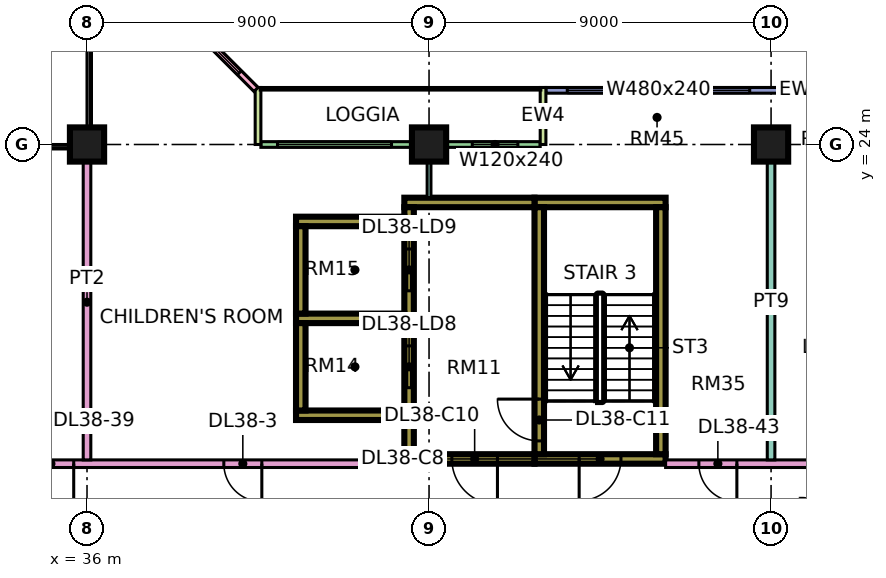
"""IFC4 building model, lengths in metres.
Left out: names, types, materials, properties, quantities, classifications, styles, units other than length and angle.
Written with IfcOpenShell. Run it as: python <this file> out.ifc"""

import sys

from ifc_helpers import new_model, si_unit, direction, frame, frame_2d, origin, origin_2d, place, context, subcontext, project, spatial, rectangle, extrude, element, fill, save


model = new_model("IFC4")
c1 = context("Model", 3, precision=1e-05, world=origin(), true_north=direction((0.0, 1.0)))
c2 = subcontext(c1, "Body", "Model", "MODEL_VIEW")
j1 = project(units=[si_unit("LENGTHUNIT", "METRE"), si_unit("PLANEANGLEUNIT", "RADIAN")], contexts=[c1])
p1 = place(None, origin())
s1 = spatial("IfcSite", under=j1, at=p1, CompositionType="ELEMENT")
p2 = place(p1, origin())
s2 = spatial("IfcBuilding", under=s1, at=p2, CompositionType="ELEMENT")
p3 = place(p2, frame((0.0, 0.0, 168.65)))
s3 = spatial("IfcBuildingStorey", under=s2, at=p3, CompositionType="ELEMENT", Elevation=168.65)
for number, where, z_axis, x_axis in (
    (1, (36.0, 24.0, 0.0), (0.0, 0.0, 1.0), (1.0, 0.0, 0.0)),
    (2, (45.0, 24.0, 0.0), (0.0, 0.0, 1.0), (1.0, 0.0, 0.0)),
    (3, (54.0, 24.0, 0.0), (0.0, 0.0, 1.0), (1.0, 0.0, 0.0)),
):
    element("IfcColumn", number, at=place(p3, frame(where, z_axis=z_axis, x_axis=x_axis)), inside=s3, PredefinedType="COLUMN", context=c2, shape_type="SweptSolid", body=[
        extrude(rectangle(XDim=0.9, YDim=0.9, at=origin_2d()), origin(), (0.0, 0.0, 1.0), 3.75),
    ])
p4 = place(p3, frame((47.775, 15.725, 0.0), z_axis=(0.0, 0.0, 1.0), x_axis=(1.0, 0.0, 0.0)))
e4 = element("IfcWall", 4, at=p4, inside=s3, PredefinedType="SHEAR", context=c2, shape_type="SweptSolid", body=[
    extrude(rectangle(XDim=3.45, YDim=0.25, at=frame_2d((1.725, 0.0))), origin(), (0.0, 0.0, 1.0), 3.75),
])
p5 = place(p4, frame((1.175, 0.0, 0.0)))
e5 = element("IfcOpeningElement", 5, at=p5, cuts=e4, PredefinedType="OPENING", context=c2, shape_type="SweptSolid", body=[
    extrude(rectangle(XDim=1.1, YDim=2.2, at=frame_2d((0.55, 1.1))), frame((0.0, 0.135, 0.0), z_axis=(0.0, -1.0, 0.0), x_axis=(1.0, 0.0, 0.0)), (0.0, 0.0, 1.0), 0.27),
])
p6 = place(p3, frame((47.775, 22.475, 0.0), z_axis=(0.0, 0.0, 1.0), x_axis=(1.0, 0.0, 0.0)))
e6 = element("IfcWall", 6, at=p6, inside=s3, PredefinedType="SHEAR", context=c2, shape_type="SweptSolid", body=[
    extrude(rectangle(XDim=3.45, YDim=0.25, at=frame_2d((1.725, 0.0))), origin(), (0.0, 0.0, 1.0), 3.75),
])
p7 = place(p3, frame((47.9, 15.85, 0.0), z_axis=(0.0, 0.0, 1.0), x_axis=(0.0, 1.0, 0.0)))
e7 = element("IfcWall", 7, at=p7, inside=s3, PredefinedType="SHEAR", context=c2, shape_type="SweptSolid", body=[
    extrude(rectangle(XDim=6.5, YDim=0.25, at=frame_2d((3.25, 0.0))), origin(), (0.0, 0.0, 1.0), 3.75),
])
p8 = place(p7, frame((0.35, 0.0, 0.0)))
e8 = element("IfcOpeningElement", 8, at=p8, cuts=e7, PredefinedType="OPENING", context=c2, shape_type="SweptSolid", body=[
    extrude(rectangle(XDim=1.1, YDim=2.2, at=frame_2d((0.55, 1.1))), frame((0.0, 0.135, 0.0), z_axis=(0.0, -1.0, 0.0), x_axis=(1.0, 0.0, 0.0)), (0.0, 0.0, 1.0), 0.27),
])
p9 = place(p3, frame((51.1, 15.85, 0.0), z_axis=(0.0, 0.0, 1.0), x_axis=(0.0, 1.0, 0.0)))
e9 = element("IfcWall", 9, at=p9, inside=s3, PredefinedType="SHEAR", context=c2, shape_type="SweptSolid", body=[
    extrude(rectangle(XDim=6.5, YDim=0.25, at=frame_2d((3.25, 0.0))), origin(), (0.0, 0.0, 1.0), 3.75),
])
p10 = place(p3, frame((44.35, 15.725, 0.0), z_axis=(0.0, 0.0, 1.0), x_axis=(1.0, 0.0, 0.0)))
e10 = element("IfcWall", 10, at=p10, inside=s3, PredefinedType="SHEAR", context=c2, shape_type="SweptSolid", body=[
    extrude(rectangle(XDim=3.425, YDim=0.25, at=frame_2d((1.712, 0.0))), origin(), (0.0, 0.0, 1.0), 3.75),
])
p11 = place(p10, frame((1.25, 0.0, 0.0)))
e11 = element("IfcOpeningElement", 11, at=p11, cuts=e10, PredefinedType="OPENING", context=c2, shape_type="SweptSolid", body=[
    extrude(rectangle(XDim=1.2, YDim=2.2, at=frame_2d((0.6, 1.1))), frame((0.0, 0.135, 0.0), z_axis=(0.0, -1.0, 0.0), x_axis=(1.0, 0.0, 0.0)), (0.0, 0.0, 1.0), 0.27),
])
p12 = place(p3, frame((44.35, 22.475, 0.0), z_axis=(0.0, 0.0, 1.0), x_axis=(1.0, 0.0, 0.0)))
e12 = element("IfcWall", 12, at=p12, inside=s3, PredefinedType="SHEAR", context=c2, shape_type="SweptSolid", body=[
    extrude(rectangle(XDim=3.425, YDim=0.25, at=frame_2d((1.712, 0.0))), origin(), (0.0, 0.0, 1.0), 3.75),
])
p13 = place(p3, frame((44.475, 15.85, 0.0), z_axis=(0.0, 0.0, 1.0), x_axis=(0.0, 1.0, 0.0)))
e13 = element("IfcWall", 13, at=p13, inside=s3, PredefinedType="SHEAR", context=c2, shape_type="SweptSolid", body=[
    extrude(rectangle(XDim=6.5, YDim=0.25, at=frame_2d((3.25, 0.0))), origin(), (0.0, 0.0, 1.0), 3.75),
])
p14 = place(p13, frame((1.75, 0.0, 0.0)))
e14 = element("IfcOpeningElement", 14, at=p14, cuts=e13, PredefinedType="OPENING", context=c2, shape_type="SweptSolid", body=[
    extrude(rectangle(XDim=1.1, YDim=2.2, at=frame_2d((0.55, 1.1))), frame((0.0, 0.135, 0.0), z_axis=(0.0, -1.0, 0.0), x_axis=(1.0, 0.0, 0.0)), (0.0, 0.0, 1.0), 0.27),
])
p15 = place(p13, frame((4.3, 0.0, 0.0)))
e15 = element("IfcOpeningElement", 15, at=p15, cuts=e13, PredefinedType="OPENING", context=c2, shape_type="SweptSolid", body=[
    extrude(rectangle(XDim=1.1, YDim=2.2, at=frame_2d((0.55, 1.1))), frame((0.0, 0.135, 0.0), z_axis=(0.0, -1.0, 0.0), x_axis=(1.0, 0.0, 0.0)), (0.0, 0.0, 1.0), 0.27),
])
for number, where, z_axis, x_axis in (
    (16, (41.5, 16.875, 0.0), (0.0, 0.0, 1.0), (1.0, 0.0, 0.0)),
    (17, (41.5, 19.425, 0.0), (0.0, 0.0, 1.0), (1.0, 0.0, 0.0)),
    (18, (41.5, 21.975, 0.0), (0.0, 0.0, 1.0), (1.0, 0.0, 0.0)),
):
    element("IfcWall", number, at=place(p3, frame(where, z_axis=z_axis, x_axis=x_axis)), inside=s3, PredefinedType="SHEAR", context=c2, shape_type="SweptSolid", body=[
        extrude(rectangle(XDim=2.85, YDim=0.25, at=frame_2d((1.425, 0.0))), origin(), (0.0, 0.0, 1.0), 3.75),
    ])
for number, where, z_axis, x_axis in (
    (19, (41.625, 17.0, 0.0), (0.0, 0.0, 1.0), (0.0, 1.0, 0.0)),
    (20, (41.625, 19.55, 0.0), (0.0, 0.0, 1.0), (0.0, 1.0, 0.0)),
):
    element("IfcWall", number, at=place(p3, frame(where, z_axis=z_axis, x_axis=x_axis)), inside=s3, PredefinedType="SHEAR", context=c2, shape_type="SweptSolid", body=[
        extrude(rectangle(XDim=2.3, YDim=0.25, at=frame_2d((1.15, 0.0))), origin(), (0.0, 0.0, 1.0), 3.75),
    ])
p16 = place(p3, frame((61.5, 25.425, 0.0), z_axis=(0.0, 0.0, 1.0), x_axis=(-1.0, 0.0, 0.0)))
e21 = element("IfcWall", 21, at=p16, inside=s3, PredefinedType="SOLIDWALL", context=c2, shape_type="SweptSolid", body=[
    extrude(rectangle(XDim=13.425, YDim=0.15, at=frame_2d((6.712, 0.0))), origin(), (0.0, 0.0, 1.0), 3.35),
])
p17 = place(p16, frame((0.3, 0.0, 0.45)))
e22 = element("IfcOpeningElement", 22, at=p17, cuts=e21, PredefinedType="OPENING", context=c2, shape_type="SweptSolid", body=[
    extrude(rectangle(XDim=0.9, YDim=2.4, at=frame_2d((0.45, 1.2))), frame((0.0, 0.085, 0.0), z_axis=(0.0, -1.0, 0.0), x_axis=(1.0, 0.0, 0.0)), (0.0, 0.0, 1.0), 0.17),
])
p18 = place(p16, frame((2.1, 0.0, 0.45)))
e23 = element("IfcOpeningElement", 23, at=p18, cuts=e21, PredefinedType="OPENING", context=c2, shape_type="SweptSolid", body=[
    extrude(rectangle(XDim=1.8, YDim=2.4, at=frame_2d((0.9, 1.2))), frame((0.0, 0.085, 0.0), z_axis=(0.0, -1.0, 0.0), x_axis=(1.0, 0.0, 0.0)), (0.0, 0.0, 1.0), 0.17),
])
p19 = place(p16, frame((5.1, 0.0, 0.45)))
e24 = element("IfcOpeningElement", 24, at=p19, cuts=e21, PredefinedType="OPENING", context=c2, shape_type="SweptSolid", body=[
    extrude(rectangle(XDim=1.8, YDim=2.4, at=frame_2d((0.9, 1.2))), frame((0.0, 0.085, 0.0), z_axis=(0.0, -1.0, 0.0), x_axis=(1.0, 0.0, 0.0)), (0.0, 0.0, 1.0), 0.17),
])
p20 = place(p16, frame((8.062, 0.0, 0.45)))
e25 = element("IfcOpeningElement", 25, at=p20, cuts=e21, PredefinedType="OPENING", context=c2, shape_type="SweptSolid", body=[
    extrude(rectangle(XDim=4.8, YDim=2.4, at=frame_2d((2.4, 1.2))), frame((0.0, 0.085, 0.0), z_axis=(0.0, -1.0, 0.0), x_axis=(1.0, 0.0, 0.0)), (0.0, 0.0, 1.0), 0.17),
])
p21 = place(p3, frame((47.925, 24.0, 0.0), z_axis=(0.0, 0.0, 1.0), x_axis=(-1.0, 0.0, 0.0)))
e26 = element("IfcWall", 26, at=p21, inside=s3, PredefinedType="SOLIDWALL", context=c2, shape_type="SweptSolid", body=[
    extrude(rectangle(XDim=7.35, YDim=0.15, at=frame_2d((3.675, 0.0))), origin(), (0.0, 0.0, 1.0), 3.35),
])
p22 = place(p21, frame((0.587, 0.0, 0.45)))
e27 = element("IfcOpeningElement", 27, at=p22, cuts=e26, PredefinedType="OPENING", context=c2, shape_type="SweptSolid", body=[
    extrude(rectangle(XDim=1.2, YDim=2.4, at=frame_2d((0.6, 1.2))), frame((0.0, 0.085, 0.0), z_axis=(0.0, -1.0, 0.0), x_axis=(1.0, 0.0, 0.0)), (0.0, 0.0, 1.0), 0.17),
])
p23 = place(p21, frame((3.913, 0.0, 0.45)))
e28 = element("IfcOpeningElement", 28, at=p23, cuts=e26, PredefinedType="OPENING", context=c2, shape_type="SweptSolid", body=[
    extrude(rectangle(XDim=3.0, YDim=2.4, at=frame_2d((1.5, 1.2))), frame((0.0, 0.085, 0.0), z_axis=(0.0, -1.0, 0.0), x_axis=(1.0, 0.0, 0.0)), (0.0, 0.0, 1.0), 0.17),
])
for number, where, z_axis, x_axis in (
    (29, (48.0, 25.5, 0.0), (0.0, 0.0, 1.0), (0.0, -1.0, 0.0)),
    (30, (40.5, 25.5, 0.0), (0.0, 0.0, 1.0), (0.0, -1.0, 0.0)),
):
    element("IfcWall", number, at=place(p3, frame(where, z_axis=z_axis, x_axis=x_axis)), inside=s3, PredefinedType="SOLIDWALL", context=c2, shape_type="SweptSolid", body=[
        extrude(rectangle(XDim=1.5, YDim=0.15, at=frame_2d((0.75, 0.0))), origin(), (0.0, 0.0, 1.0), 3.35),
    ])
p24 = place(p3, frame((40.447, 25.447, 0.0), z_axis=(0.0, 0.0, 1.0), x_axis=(-0.707106781187, 0.707106781187, 0.0)))
e31 = element("IfcWall", 31, at=p24, inside=s3, PredefinedType="SOLIDWALL", context=c2, shape_type="SweptSolid", body=[
    extrude(rectangle(XDim=4.243, YDim=0.15, at=frame_2d((2.121, 0.0))), origin(), (0.0, 0.0, 1.0), 3.35),
])
p25 = place(p24, frame((0.621, 0.0, 0.45)))
e32 = element("IfcOpeningElement", 32, at=p25, cuts=e31, PredefinedType="OPENING", context=c2, shape_type="SweptSolid", body=[
    extrude(rectangle(XDim=3.0, YDim=2.4, at=frame_2d((1.5, 1.2))), frame((0.0, 0.085, 0.0), z_axis=(0.0, -1.0, 0.0), x_axis=(1.0, 0.0, 0.0)), (0.0, 0.0, 1.0), 0.17),
])
p26 = place(p3, frame((34.0, 15.6, 0.0), z_axis=(0.0, 0.0, 1.0), x_axis=(1.0, 0.0, 0.0)))
e33 = element("IfcWall", 33, at=p26, inside=s3, PredefinedType="PARTITIONING", context=c2, shape_type="SweptSolid", body=[
    extrude(rectangle(XDim=10.35, YDim=0.2, at=frame_2d((5.175, 0.0))), origin(), (0.0, 0.0, 1.0), 3.35),
])
p27 = place(p26, frame((5.6, 0.0, 0.0)))
e34 = element("IfcOpeningElement", 34, at=p27, cuts=e33, PredefinedType="OPENING", context=c2, shape_type="SweptSolid", body=[
    extrude(rectangle(XDim=1.0, YDim=2.1, at=frame_2d((0.5, 1.05))), frame((0.0, 0.11, 0.0), z_axis=(0.0, -1.0, 0.0), x_axis=(1.0, 0.0, 0.0)), (0.0, 0.0, 1.0), 0.22),
])
p28 = place(p26, frame((0.45, 0.0, 0.0)))
e35 = element("IfcOpeningElement", 35, at=p28, cuts=e33, PredefinedType="OPENING", context=c2, shape_type="SweptSolid", body=[
    extrude(rectangle(XDim=1.2, YDim=2.1, at=frame_2d((0.6, 1.05))), frame((0.0, 0.11, 0.0), z_axis=(0.0, -1.0, 0.0), x_axis=(1.0, 0.0, 0.0)), (0.0, 0.0, 1.0), 0.22),
])
p29 = place(p3, frame((36.0, 15.7, 0.0), z_axis=(0.0, 0.0, 1.0), x_axis=(0.0, 1.0, 0.0)))
e36 = element("IfcWall", 36, at=p29, inside=s3, PredefinedType="PARTITIONING", context=c2, shape_type="SweptSolid", body=[
    extrude(rectangle(XDim=8.3, YDim=0.2, at=frame_2d((4.15, 0.0))), origin(), (0.0, 0.0, 1.0), 3.35),
])
p30 = place(p3, frame((45.0, 22.6, 0.0), z_axis=(0.0, 0.0, 1.0), x_axis=(0.0, 1.0, 0.0)))
e37 = element("IfcWall", 37, at=p30, inside=s3, PredefinedType="PARTITIONING", context=c2, shape_type="SweptSolid", body=[
    extrude(rectangle(XDim=1.326, YDim=0.1, at=frame_2d((0.663, 0.0))), origin(), (0.0, 0.0, 1.0), 3.35),
])
p31 = place(p3, frame((51.225, 15.6, 0.0), z_axis=(0.0, 0.0, 1.0), x_axis=(1.0, 0.0, 0.0)))
e38 = element("IfcWall", 38, at=p31, inside=s3, PredefinedType="PARTITIONING", context=c2, shape_type="SweptSolid", body=[
    extrude(rectangle(XDim=11.701, YDim=0.2, at=frame_2d((5.851, 0.0))), origin(), (0.0, 0.0, 1.0), 3.35),
])
p32 = place(p31, frame((3.875, 0.0, 0.0)))
e39 = element("IfcOpeningElement", 39, at=p32, cuts=e38, PredefinedType="OPENING", context=c2, shape_type="SweptSolid", body=[
    extrude(rectangle(XDim=1.0, YDim=2.1, at=frame_2d((0.5, 1.05))), frame((0.0, 0.11, 0.0), z_axis=(0.0, -1.0, 0.0), x_axis=(1.0, 0.0, 0.0)), (0.0, 0.0, 1.0), 0.22),
])
p33 = place(p31, frame((0.875, 0.0, 0.0)))
e40 = element("IfcOpeningElement", 40, at=p33, cuts=e38, PredefinedType="OPENING", context=c2, shape_type="SweptSolid", body=[
    extrude(rectangle(XDim=1.0, YDim=2.1, at=frame_2d((0.5, 1.05))), frame((0.0, 0.11, 0.0), z_axis=(0.0, -1.0, 0.0), x_axis=(1.0, 0.0, 0.0)), (0.0, 0.0, 1.0), 0.22),
])
p34 = place(p3, frame((54.0, 15.7, 0.0), z_axis=(0.0, 0.0, 1.0), x_axis=(0.0, 1.0, 0.0)))
e41 = element("IfcWall", 41, at=p34, inside=s3, PredefinedType="PARTITIONING", context=c2, shape_type="SweptSolid", body=[
    extrude(rectangle(XDim=8.3, YDim=0.2, at=frame_2d((4.15, 0.0))), origin(), (0.0, 0.0, 1.0), 3.35),
])
p35 = place(p19, origin())
e42 = element("IfcWindow", 42, at=p35, inside=s3, PartitioningType="SINGLE_PANEL", PredefinedType="WINDOW", context=c2, shape_type="SweptSolid", body=[
    extrude(rectangle(XDim=1.8, YDim=2.4, at=frame_2d((0.9, 1.2))), frame((0.0, 0.03, 0.0), z_axis=(0.0, -1.0, 0.0), x_axis=(1.0, 0.0, 0.0)), (0.0, 0.0, 1.0), 0.06),
])
fill(e24, e42)
p36 = place(p20, origin())
e43 = element("IfcWindow", 43, at=p36, inside=s3, PartitioningType="SINGLE_PANEL", PredefinedType="WINDOW", context=c2, shape_type="SweptSolid", body=[
    extrude(rectangle(XDim=4.8, YDim=2.4, at=frame_2d((2.4, 1.2))), frame((0.0, 0.03, 0.0), z_axis=(0.0, -1.0, 0.0), x_axis=(1.0, 0.0, 0.0)), (0.0, 0.0, 1.0), 0.06),
])
fill(e25, e43)
p37 = place(p22, origin())
e44 = element("IfcWindow", 44, at=p37, inside=s3, PartitioningType="SINGLE_PANEL", PredefinedType="WINDOW", context=c2, shape_type="SweptSolid", body=[
    extrude(rectangle(XDim=1.2, YDim=2.4, at=frame_2d((0.6, 1.2))), frame((0.0, 0.03, 0.0), z_axis=(0.0, -1.0, 0.0), x_axis=(1.0, 0.0, 0.0)), (0.0, 0.0, 1.0), 0.06),
])
fill(e27, e44)
p38 = place(p23, origin())
e45 = element("IfcWindow", 45, at=p38, inside=s3, PartitioningType="SINGLE_PANEL", PredefinedType="WINDOW", context=c2, shape_type="SweptSolid", body=[
    extrude(rectangle(XDim=3.0, YDim=2.4, at=frame_2d((1.5, 1.2))), frame((0.0, 0.03, 0.0), z_axis=(0.0, -1.0, 0.0), x_axis=(1.0, 0.0, 0.0)), (0.0, 0.0, 1.0), 0.06),
])
fill(e28, e45)
p39 = place(p25, origin())
e46 = element("IfcWindow", 46, at=p39, inside=s3, PartitioningType="SINGLE_PANEL", PredefinedType="WINDOW", context=c2, shape_type="SweptSolid", body=[
    extrude(rectangle(XDim=3.0, YDim=2.4, at=frame_2d((1.5, 1.2))), frame((0.0, 0.03, 0.0), z_axis=(0.0, -1.0, 0.0), x_axis=(1.0, 0.0, 0.0)), (0.0, 0.0, 1.0), 0.06),
])
fill(e32, e46)
p40 = place(p5, frame((1.1, 0.0, 0.0), z_axis=(0.0, 0.0, 1.0), x_axis=(-1.0, 0.0, 0.0)))
e47 = element("IfcDoor", 47, at=p40, inside=s3, OperationType="SINGLE_SWING_LEFT", PredefinedType="DOOR", context=c2, shape_type="SweptSolid", body=[
    extrude(rectangle(XDim=1.1, YDim=2.2, at=frame_2d((0.55, 1.1))), frame((0.0, 0.025, 0.0), z_axis=(0.0, -1.0, 0.0), x_axis=(1.0, 0.0, 0.0)), (0.0, 0.0, 1.0), 0.05),
])
fill(e5, e47)
p41 = place(p11, origin())
e48 = element("IfcDoor", 48, at=p41, inside=s3, OperationType="SINGLE_SWING_RIGHT", PredefinedType="DOOR", context=c2, shape_type="SweptSolid", body=[
    extrude(rectangle(XDim=1.2, YDim=2.2, at=frame_2d((0.6, 1.1))), frame((0.0, 0.025, 0.0), z_axis=(0.0, -1.0, 0.0), x_axis=(1.0, 0.0, 0.0)), (0.0, 0.0, 1.0), 0.05),
])
fill(e11, e48)
p42 = place(p8, frame((1.1, 0.0, 0.0), z_axis=(0.0, 0.0, 1.0), x_axis=(-1.0, 0.0, 0.0)))
e49 = element("IfcDoor", 49, at=p42, inside=s3, OperationType="SINGLE_SWING_RIGHT", PredefinedType="DOOR", context=c2, shape_type="SweptSolid", body=[
    extrude(rectangle(XDim=1.1, YDim=2.2, at=frame_2d((0.55, 1.1))), frame((0.0, 0.025, 0.0), z_axis=(0.0, -1.0, 0.0), x_axis=(1.0, 0.0, 0.0)), (0.0, 0.0, 1.0), 0.05),
])
fill(e8, e49)
p43 = place(p14, origin())
e50 = element("IfcDoor", 50, at=p43, inside=s3, OperationType="DOUBLE_DOOR_SLIDING", PredefinedType="DOOR", context=c2, shape_type="SweptSolid", body=[
    extrude(rectangle(XDim=1.1, YDim=2.2, at=frame_2d((0.55, 1.1))), frame((0.0, 0.025, 0.0), z_axis=(0.0, -1.0, 0.0), x_axis=(1.0, 0.0, 0.0)), (0.0, 0.0, 1.0), 0.05),
])
fill(e14, e50)
p44 = place(p15, origin())
e51 = element("IfcDoor", 51, at=p44, inside=s3, OperationType="DOUBLE_DOOR_SLIDING", PredefinedType="DOOR", context=c2, shape_type="SweptSolid", body=[
    extrude(rectangle(XDim=1.1, YDim=2.2, at=frame_2d((0.55, 1.1))), frame((0.0, 0.025, 0.0), z_axis=(0.0, -1.0, 0.0), x_axis=(1.0, 0.0, 0.0)), (0.0, 0.0, 1.0), 0.05),
])
fill(e15, e51)
p45 = place(p27, origin())
e52 = element("IfcDoor", 52, at=p45, inside=s3, OperationType="SINGLE_SWING_RIGHT", PredefinedType="DOOR", context=c2, shape_type="SweptSolid", body=[
    extrude(rectangle(XDim=1.0, YDim=2.1, at=frame_2d((0.5, 1.05))), frame((0.0, 0.025, 0.0), z_axis=(0.0, -1.0, 0.0), x_axis=(1.0, 0.0, 0.0)), (0.0, 0.0, 1.0), 0.05),
])
fill(e34, e52)
p46 = place(p28, origin())
e53 = element("IfcDoor", 53, at=p46, inside=s3, OperationType="SINGLE_SWING_RIGHT", PredefinedType="DOOR", context=c2, shape_type="SweptSolid", body=[
    extrude(rectangle(XDim=1.2, YDim=2.1, at=frame_2d((0.6, 1.05))), frame((0.0, 0.025, 0.0), z_axis=(0.0, -1.0, 0.0), x_axis=(1.0, 0.0, 0.0)), (0.0, 0.0, 1.0), 0.05),
])
fill(e35, e53)
p47 = place(p33, origin())
e54 = element("IfcDoor", 54, at=p47, inside=s3, OperationType="SINGLE_SWING_RIGHT", PredefinedType="DOOR", context=c2, shape_type="SweptSolid", body=[
    extrude(rectangle(XDim=1.0, YDim=2.1, at=frame_2d((0.5, 1.05))), frame((0.0, 0.025, 0.0), z_axis=(0.0, -1.0, 0.0), x_axis=(1.0, 0.0, 0.0)), (0.0, 0.0, 1.0), 0.05),
])
fill(e40, e54)
save(model, sys.argv[1])
